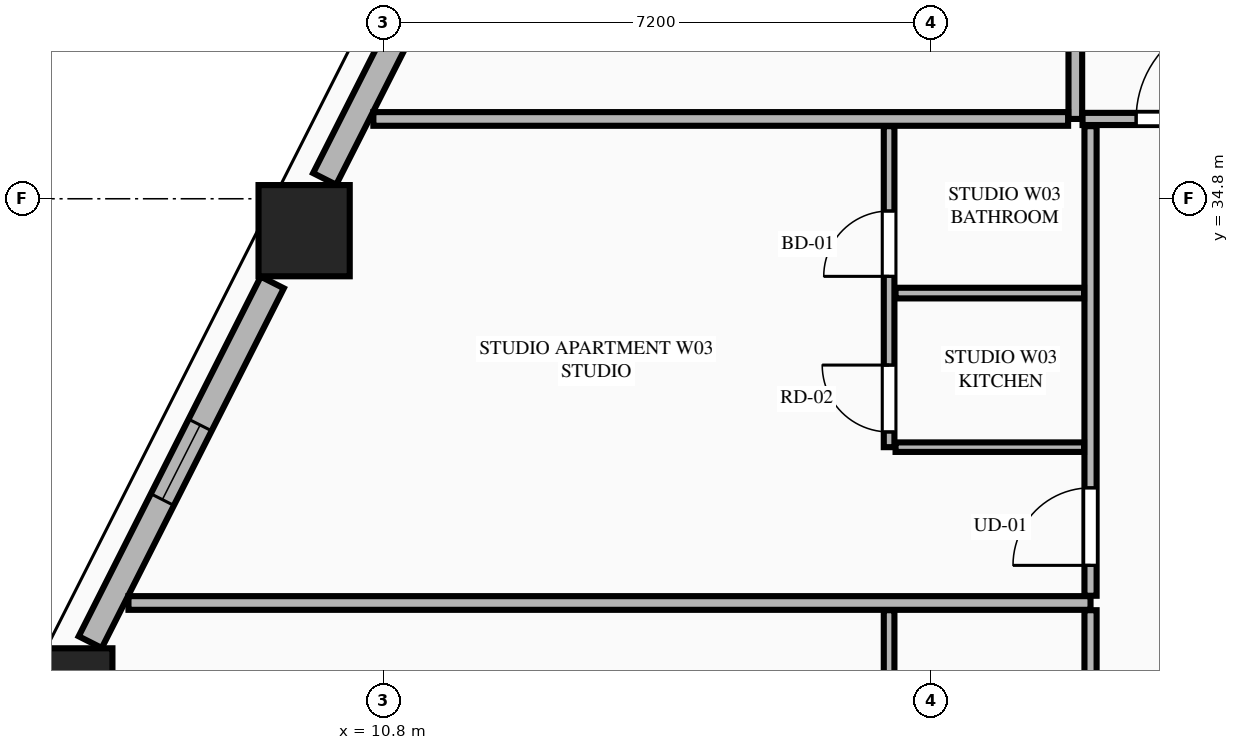
"""IFC4 building model, lengths in metres.
Left out: names, types, materials, properties, quantities, classifications, styles, units other than length and angle.
Written with IfcOpenShell. Run it as: python <this file> out.ifc"""

import sys

from ifc_helpers import new_model, si_unit, direction, frame, frame_2d, origin, origin_2d, place, context, subcontext, project, spatial, rectangle, extrude, element, fill, save


model = new_model("IFC4")
c1 = context("Model", 3, precision=1e-05, world=origin(), true_north=direction((0.0, 1.0)))
c2 = subcontext(c1, "Body", "Model", "MODEL_VIEW")
j1 = project(units=[si_unit("LENGTHUNIT", "METRE"), si_unit("PLANEANGLEUNIT", "RADIAN")], contexts=[c1])
p1 = place(None, origin())
s1 = spatial("IfcSite", under=j1, at=p1, CompositionType="ELEMENT")
p2 = place(p1, origin())
s2 = spatial("IfcBuilding", under=s1, at=p2, CompositionType="ELEMENT")
p3 = place(p2, frame((0.0, 0.0, 42.65)))
s3 = spatial("IfcBuildingStorey", under=s2, at=p3, CompositionType="ELEMENT", Elevation=42.65)
for number, where, z_axis, x_axis in (
    (1, (9.754, 34.38, 0.0), (0.0, 0.0, 1.0), (1.0, 0.0, 0.0)),
    (2, (6.632, 28.286, 0.0), (0.0, 0.0, 1.0), (1.0, 0.0, 0.0)),
):
    element("IfcColumn", number, at=place(p3, frame(where, z_axis=z_axis, x_axis=x_axis)), inside=s3, PredefinedType="COLUMN", context=c2, shape_type="SweptSolid", body=[
        extrude(rectangle(XDim=1.2, YDim=1.2, at=origin_2d()), origin(), (0.0, 0.0, 1.0), 3.55),
    ])
p4 = place(p3, frame((12.529, 40.01, 0.0), z_axis=(0.0, 0.0, 1.0), x_axis=(-0.451627137896, -0.892206774417, 0.0)))
e3 = element("IfcWall", 3, at=p4, inside=s3, PredefinedType="STANDARD", context=c2, shape_type="SweptSolid", body=[
    extrude(rectangle(XDim=5.547, YDim=0.34, at=frame_2d((2.773, 0.0))), origin(), (0.0, 0.0, 1.0), 2.787),
])
p5 = place(p4, frame((2.223, 0.0, 0.75)))
e4 = element("IfcOpeningElement", 4, at=p5, cuts=e3, PredefinedType="OPENING", context=c2, shape_type="SweptSolid", body=[
    extrude(rectangle(XDim=1.1, YDim=1.887, at=frame_2d((0.55, 0.943))), frame((0.0, 0.18, 0.0), z_axis=(0.0, -1.0, 0.0), x_axis=(1.0, 0.0, 0.0)), (0.0, 0.0, 1.0), 0.36),
])
p6 = place(p3, frame((9.335, 33.699, 0.0), z_axis=(0.0, 0.0, 1.0), x_axis=(-0.451590635984, -0.892225250422, 0.0)))
e5 = element("IfcWall", 5, at=p6, inside=s3, PredefinedType="STANDARD", context=c2, shape_type="SweptSolid", body=[
    extrude(rectangle(XDim=5.303, YDim=0.34, at=frame_2d((2.652, 0.0))), origin(), (0.0, 0.0, 1.0), 2.787),
])
p7 = place(p6, frame((2.102, 0.0, 0.75)))
e6 = element("IfcOpeningElement", 6, at=p7, cuts=e5, PredefinedType="OPENING", context=c2, shape_type="SweptSolid", body=[
    extrude(rectangle(XDim=1.1, YDim=1.887, at=frame_2d((0.55, 0.943))), frame((0.0, 0.18, 0.0), z_axis=(0.0, -1.0, 0.0), x_axis=(1.0, 0.0, 0.0)), (0.0, 0.0, 1.0), 0.36),
])
p8 = place(p3, frame((19.9, 35.85, 0.0), z_axis=(0.0, 0.0, 1.0), x_axis=(0.0, 1.0, 0.0)))
e7 = element("IfcWall", 7, at=p8, inside=s3, PredefinedType="PARTITIONING", context=c2, shape_type="SweptSolid", body=[
    extrude(rectangle(XDim=13.295, YDim=0.18, at=frame_2d((6.647, 0.0))), origin(), (0.0, 0.0, 1.0), 3.33),
])
p9 = place(p3, frame((19.995, 35.85, 0.0), z_axis=(0.0, 0.0, 1.0), x_axis=(1.0, 0.0, 0.0)))
e8 = element("IfcWall", 8, at=p9, inside=s3, PredefinedType="PARTITIONING", context=c2, shape_type="SweptSolid", body=[
    extrude(rectangle(XDim=24.81, YDim=0.16, at=frame_2d((12.405, 0.0))), origin(), (0.0, 0.0, 1.0), 3.33),
])
p10 = place(p9, frame((0.705, 0.0, 0.0)))
e9 = element("IfcOpeningElement", 9, at=p10, cuts=e8, PredefinedType="OPENING", context=c2, shape_type="SweptSolid", body=[
    extrude(rectangle(XDim=1.35, YDim=2.35, at=frame_2d((0.675, 1.175))), frame((0.0, 0.09, 0.0), z_axis=(0.0, -1.0, 0.0), x_axis=(1.0, 0.0, 0.0)), (0.0, 0.0, 1.0), 0.18),
])
p11 = place(p3, frame((10.665, 35.85, 0.0), z_axis=(0.0, 0.0, 1.0), x_axis=(1.0, 0.0, 0.0)))
e10 = element("IfcWall", 10, at=p11, inside=s3, PredefinedType="PARTITIONING", context=c2, shape_type="SweptSolid", body=[
    extrude(rectangle(XDim=9.14, YDim=0.18, at=frame_2d((4.57, 0.0))), origin(), (0.0, 0.0, 1.0), 3.33),
])
p12 = place(p3, frame((20.1, 22.811, 0.0), z_axis=(0.0, 0.0, 1.0), x_axis=(0.0, 1.0, 0.0)))
e11 = element("IfcWall", 11, at=p12, inside=s3, PredefinedType="PARTITIONING", context=c2, shape_type="SweptSolid", body=[
    extrude(rectangle(XDim=6.576, YDim=0.16, at=frame_2d((3.288, 0.0))), origin(), (0.0, 0.0, 1.0), 3.33),
])
p13 = place(p12, frame((0.4, 0.0, 0.0)))
e12 = element("IfcOpeningElement", 12, at=p13, cuts=e11, PredefinedType="OPENING", context=c2, shape_type="SweptSolid", body=[
    extrude(rectangle(XDim=1.02, YDim=2.25, at=frame_2d((0.51, 1.125))), frame((0.0, 0.09, 0.0), z_axis=(0.0, -1.0, 0.0), x_axis=(1.0, 0.0, 0.0)), (0.0, 0.0, 1.0), 0.18),
])
p14 = place(p3, frame((17.45, 24.766, 0.0), z_axis=(0.0, 0.0, 1.0), x_axis=(0.0, 1.0, 0.0)))
e13 = element("IfcWall", 13, at=p14, inside=s3, PredefinedType="PLUMBINGWALL", context=c2, shape_type="SweptSolid", body=[
    extrude(rectangle(XDim=4.621, YDim=0.14, at=frame_2d((2.311, 0.0))), origin(), (0.0, 0.0, 1.0), 3.33),
])
p15 = place(p14, frame((2.438, 0.0, 0.0)))
e14 = element("IfcOpeningElement", 14, at=p15, cuts=e13, PredefinedType="OPENING", context=c2, shape_type="SweptSolid", body=[
    extrude(rectangle(XDim=0.86, YDim=2.1, at=frame_2d((0.43, 1.05))), frame((0.0, 0.08, 0.0), z_axis=(0.0, -1.0, 0.0), x_axis=(1.0, 0.0, 0.0)), (0.0, 0.0, 1.0), 0.16),
])
p16 = place(p14, frame((0.2, 0.0, 0.0)))
e15 = element("IfcOpeningElement", 15, at=p16, cuts=e13, PredefinedType="OPENING", context=c2, shape_type="SweptSolid", body=[
    extrude(rectangle(XDim=0.88, YDim=2.15, at=frame_2d((0.44, 1.075))), frame((0.0, 0.08, 0.0), z_axis=(0.0, -1.0, 0.0), x_axis=(1.0, 0.0, 0.0)), (0.0, 0.0, 1.0), 0.16),
])
p17 = place(p3, frame((7.443, 29.482, 0.0), z_axis=(0.0, 0.0, 1.0), x_axis=(1.0, 0.0, 0.0)))
e16 = element("IfcWall", 16, at=p17, inside=s3, PredefinedType="PARTITIONING", context=c2, shape_type="SweptSolid", body=[
    extrude(rectangle(XDim=12.657, YDim=0.18, at=frame_2d((6.329, 0.0))), origin(), (0.0, 0.0, 1.0), 3.33),
])
p18 = place(p3, frame((20.1, 29.577, 0.0), z_axis=(0.0, 0.0, 1.0), x_axis=(0.0, 1.0, 0.0)))
e17 = element("IfcWall", 17, at=p18, inside=s3, PredefinedType="PARTITIONING", context=c2, shape_type="SweptSolid", body=[
    extrude(rectangle(XDim=6.178, YDim=0.16, at=frame_2d((3.089, 0.0))), origin(), (0.0, 0.0, 1.0), 2.7),
])
p19 = place(p18, frame((0.4, 0.0, 0.0)))
e18 = element("IfcOpeningElement", 18, at=p19, cuts=e17, PredefinedType="OPENING", context=c2, shape_type="SweptSolid", body=[
    extrude(rectangle(XDim=1.02, YDim=2.25, at=frame_2d((0.51, 1.125))), frame((0.0, 0.09, 0.0), z_axis=(0.0, -1.0, 0.0), x_axis=(1.0, 0.0, 0.0)), (0.0, 0.0, 1.0), 0.18),
])
p20 = place(p3, frame((17.535, 31.532, 0.0), z_axis=(0.0, 0.0, 1.0), x_axis=(1.0, 0.0, 0.0)))
e19 = element("IfcWall", 19, at=p20, inside=s3, PredefinedType="PARTITIONING", context=c2, shape_type="SweptSolid", body=[
    extrude(rectangle(XDim=2.48, YDim=0.125, at=frame_2d((1.24, 0.0))), origin(), (0.0, 0.0, 1.0), 3.33),
])
p21 = place(p3, frame((17.45, 31.532, 0.0), z_axis=(0.0, 0.0, 1.0), x_axis=(0.0, 1.0, 0.0)))
e20 = element("IfcWall", 20, at=p21, inside=s3, PredefinedType="PLUMBINGWALL", context=c2, shape_type="SweptSolid", body=[
    extrude(rectangle(XDim=4.223, YDim=0.14, at=frame_2d((2.111, 0.0))), origin(), (0.0, 0.0, 1.0), 3.33),
])
p22 = place(p21, frame((2.247, 0.0, 0.0)))
e21 = element("IfcOpeningElement", 21, at=p22, cuts=e20, PredefinedType="OPENING", context=c2, shape_type="SweptSolid", body=[
    extrude(rectangle(XDim=0.86, YDim=2.1, at=frame_2d((0.43, 1.05))), frame((0.0, 0.08, 0.0), z_axis=(0.0, -1.0, 0.0), x_axis=(1.0, 0.0, 0.0)), (0.0, 0.0, 1.0), 0.16),
])
p23 = place(p21, frame((0.2, 0.0, 0.0)))
e22 = element("IfcOpeningElement", 22, at=p23, cuts=e20, PredefinedType="OPENING", context=c2, shape_type="SweptSolid", body=[
    extrude(rectangle(XDim=0.88, YDim=2.15, at=frame_2d((0.44, 1.075))), frame((0.0, 0.08, 0.0), z_axis=(0.0, -1.0, 0.0), x_axis=(1.0, 0.0, 0.0)), (0.0, 0.0, 1.0), 0.16),
])
p24 = place(p3, frame((17.535, 33.559, 0.0), z_axis=(0.0, 0.0, 1.0), x_axis=(1.0, 0.0, 0.0)))
e23 = element("IfcWall", 23, at=p24, inside=s3, PredefinedType="PLUMBINGWALL", context=c2, shape_type="SweptSolid", body=[
    extrude(rectangle(XDim=2.48, YDim=0.14, at=frame_2d((1.24, 0.0))), origin(), (0.0, 0.0, 1.0), 2.7),
])
p25 = place(p7, origin())
e24 = element("IfcWindow", 24, at=p25, inside=s3, PartitioningType="SINGLE_PANEL", PredefinedType="WINDOW", context=c2, shape_type="SweptSolid", body=[
    extrude(rectangle(XDim=1.1, YDim=1.887, at=frame_2d((0.55, 0.943))), frame((0.0, 0.03, 0.0), z_axis=(0.0, -1.0, 0.0), x_axis=(1.0, 0.0, 0.0)), (0.0, 0.0, 1.0), 0.06),
])
fill(e6, e24)
p26 = place(p10, origin())
e25 = element("IfcDoor", 25, at=p26, inside=s3, OperationType="SINGLE_SWING_RIGHT", PredefinedType="DOOR", context=c2, shape_type="SweptSolid", body=[
    extrude(rectangle(XDim=1.35, YDim=2.35, at=frame_2d((0.675, 1.175))), frame((0.0, 0.025, 0.0), z_axis=(0.0, -1.0, 0.0), x_axis=(1.0, 0.0, 0.0)), (0.0, 0.0, 1.0), 0.05),
])
fill(e9, e25)
p27 = place(p22, origin())
e26 = element("IfcDoor", 26, at=p27, inside=s3, OperationType="SINGLE_SWING_LEFT", PredefinedType="DOOR", context=c2, shape_type="SweptSolid", body=[
    extrude(rectangle(XDim=0.86, YDim=2.1, at=frame_2d((0.43, 1.05))), frame((0.0, 0.025, 0.0), z_axis=(0.0, -1.0, 0.0), x_axis=(1.0, 0.0, 0.0)), (0.0, 0.0, 1.0), 0.05),
])
fill(e21, e26)
p28 = place(p19, origin())
e27 = element("IfcDoor", 27, at=p28, inside=s3, OperationType="SINGLE_SWING_LEFT", PredefinedType="DOOR", context=c2, shape_type="SweptSolid", body=[
    extrude(rectangle(XDim=1.02, YDim=2.25, at=frame_2d((0.51, 1.125))), frame((0.0, 0.025, 0.0), z_axis=(0.0, -1.0, 0.0), x_axis=(1.0, 0.0, 0.0)), (0.0, 0.0, 1.0), 0.05),
])
fill(e18, e27)
p29 = place(p23, origin())
e28 = element("IfcDoor", 28, at=p29, inside=s3, OperationType="SINGLE_SWING_RIGHT", PredefinedType="DOOR", context=c2, shape_type="SweptSolid", body=[
    extrude(rectangle(XDim=0.88, YDim=2.15, at=frame_2d((0.44, 1.075))), frame((0.0, 0.025, 0.0), z_axis=(0.0, -1.0, 0.0), x_axis=(1.0, 0.0, 0.0)), (0.0, 0.0, 1.0), 0.05),
])
fill(e22, e28)
save(model, sys.argv[1])
